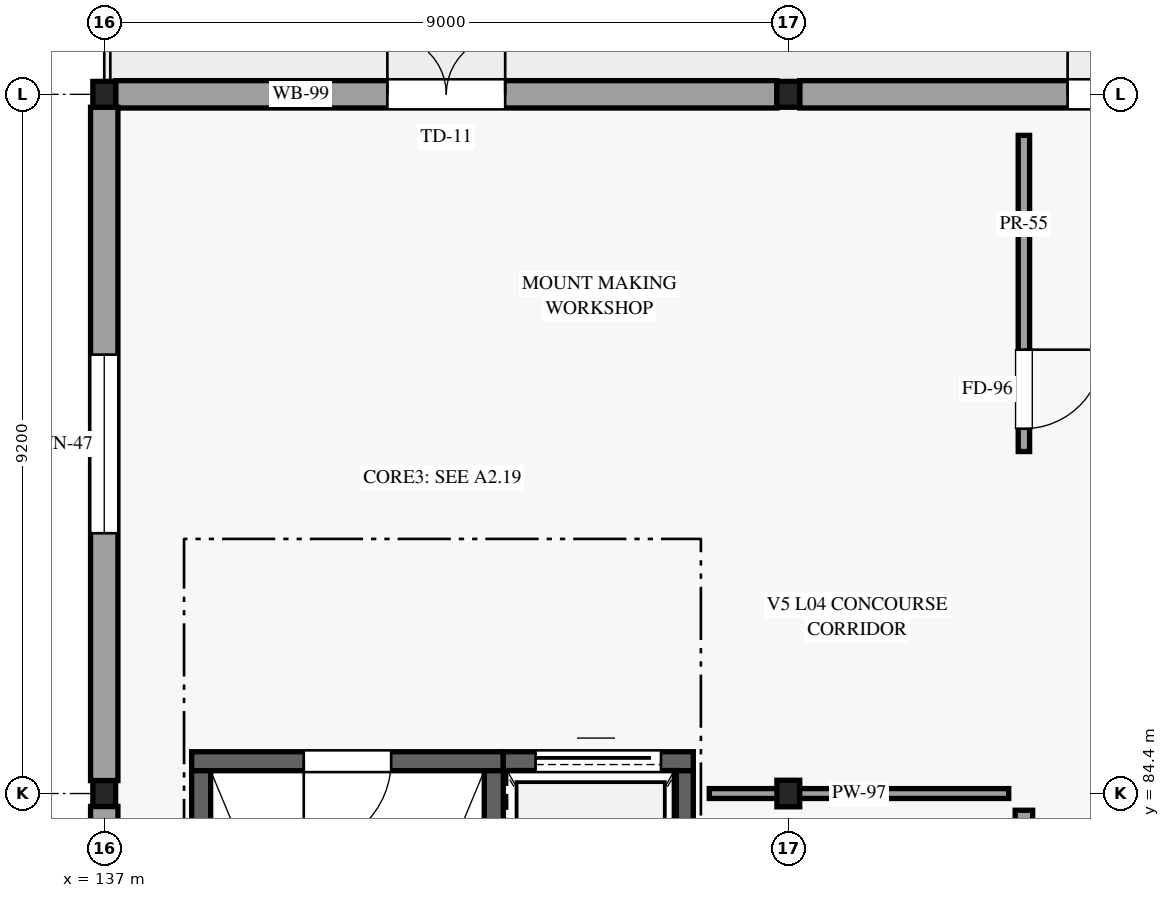
"""IFC4 building model, lengths in metres.
Left out: names, types, materials, properties, quantities, classifications, styles, units other than length and angle.
Written with IfcOpenShell. Run it as: python <this file> out.ifc"""

import sys

from ifc_helpers import new_model, si_unit, direction, frame, frame_2d, origin, origin_2d, place, context, subcontext, project, spatial, rectangle, i_section, extrude, element, fill, save


model = new_model("IFC4")
c1 = context("Model", 3, precision=1e-05, world=origin(), true_north=direction((0.0, 1.0)))
c2 = subcontext(c1, "Body", "Model", "MODEL_VIEW")
j1 = project(units=[si_unit("LENGTHUNIT", "METRE"), si_unit("PLANEANGLEUNIT", "RADIAN")], contexts=[c1])
p1 = place(None, origin())
s1 = spatial("IfcSite", under=j1, at=p1, CompositionType="ELEMENT")
p2 = place(p1, origin())
s2 = spatial("IfcBuilding", under=s1, at=p2, CompositionType="ELEMENT")
p3 = place(p2, frame((0.0, 0.0, 19.5)))
s3 = spatial("IfcBuildingStorey", under=s2, at=p3, CompositionType="ELEMENT", Elevation=19.5)
for number, where, z_axis, x_axis in (
    (1, (137.0, 84.4, 0.0), (0.0, 0.0, 1.0), (1.0, 0.0, 0.0)),
    (2, (137.0, 93.6, 0.0), (0.0, 0.0, 1.0), (1.0, 0.0, 0.0)),
):
    element("IfcColumn", number, at=place(p3, frame(where, z_axis=z_axis, x_axis=x_axis)), inside=s3, PredefinedType="COLUMN", context=c2, shape_type="SweptSolid", body=[
        extrude(i_section(OverallWidth=0.3, OverallDepth=0.34, WebThickness=0.012, FlangeThickness=0.021, FilletRadius=0.027, at=origin_2d()), origin(), (0.0, 0.0, 1.0), 4.5),
    ])
p4 = place(p3, frame((146.0, 84.4, 0.0), z_axis=(0.0, 0.0, 1.0), x_axis=(1.0, 0.0, 0.0)))
e3 = element("IfcColumn", 3, at=p4, inside=s3, PredefinedType="COLUMN", context=c2, shape_type="SweptSolid", body=[
    extrude(i_section(OverallWidth=0.3, OverallDepth=0.35, WebThickness=0.01, FlangeThickness=0.018, FilletRadius=0.027, at=origin_2d()), origin(), (0.0, 0.0, 1.0), 4.5),
])
p5 = place(p3, frame((146.0, 93.6, 0.0), z_axis=(0.0, 0.0, 1.0), x_axis=(1.0, 0.0, 0.0)))
e4 = element("IfcColumn", 4, at=p5, inside=s3, PredefinedType="COLUMN", context=c2, shape_type="SweptSolid", body=[
    extrude(i_section(OverallWidth=0.3, OverallDepth=0.34, WebThickness=0.012, FlangeThickness=0.021, FilletRadius=0.027, at=origin_2d()), origin(), (0.0, 0.0, 1.0), 4.5),
])
p6 = place(p3, frame((137.15, 93.6, 0.0), z_axis=(0.0, 0.0, 1.0), x_axis=(1.0, 0.0, 0.0)))
e5 = element("IfcWall", 5, at=p6, inside=s3, PredefinedType="STANDARD", context=c2, shape_type="SweptSolid", body=[
    extrude(rectangle(XDim=8.7, YDim=0.36, at=frame_2d((4.35, 0.0))), origin(), (0.0, 0.0, 1.0), 3.825),
])
p7 = place(p6, frame((3.575, 0.0, 0.0)))
e6 = element("IfcOpeningElement", 6, at=p7, cuts=e5, PredefinedType="OPENING", context=c2, shape_type="SweptSolid", body=[
    extrude(rectangle(XDim=1.55, YDim=2.3, at=frame_2d((0.775, 1.15))), frame((0.0, 0.19, 0.0), z_axis=(0.0, -1.0, 0.0), x_axis=(1.0, 0.0, 0.0)), (0.0, 0.0, 1.0), 0.38),
])
p8 = place(p3, frame((146.15, 93.6, 0.0), z_axis=(0.0, 0.0, 1.0), x_axis=(1.0, 0.0, 0.0)))
e7 = element("IfcWall", 7, at=p8, inside=s3, PredefinedType="STANDARD", context=c2, shape_type="SweptSolid", body=[
    extrude(rectangle(XDim=8.7, YDim=0.36, at=frame_2d((4.35, 0.0))), origin(), (0.0, 0.0, 1.0), 3.825),
])
p9 = place(p8, frame((3.525, 0.0, 0.0)))
e8 = element("IfcOpeningElement", 8, at=p9, cuts=e7, PredefinedType="OPENING", context=c2, shape_type="SweptSolid", body=[
    extrude(rectangle(XDim=1.65, YDim=2.35, at=frame_2d((0.825, 1.175))), frame((0.0, 0.19, 0.0), z_axis=(0.0, -1.0, 0.0), x_axis=(1.0, 0.0, 0.0)), (0.0, 0.0, 1.0), 0.38),
])
p10 = place(p3, frame((137.0, 75.37, 0.0), z_axis=(0.0, 0.0, 1.0), x_axis=(0.0, 1.0, 0.0)))
e9 = element("IfcWall", 9, at=p10, inside=s3, PredefinedType="STANDARD", context=c2, shape_type="SweptSolid", body=[
    extrude(rectangle(XDim=8.86, YDim=0.36, at=frame_2d((4.43, 0.0))), origin(), (0.0, 0.0, 1.0), 3.825),
])
p11 = place(p10, frame((3.355, 0.0, 0.85)))
e10 = element("IfcOpeningElement", 10, at=p11, cuts=e9, PredefinedType="OPENING", context=c2, shape_type="SweptSolid", body=[
    extrude(rectangle(XDim=2.15, YDim=2.25, at=frame_2d((1.075, 1.125))), frame((0.0, 0.19, 0.0), z_axis=(0.0, -1.0, 0.0), x_axis=(1.0, 0.0, 0.0)), (0.0, 0.0, 1.0), 0.38),
])
p12 = place(p3, frame((137.0, 84.57, 0.0), z_axis=(0.0, 0.0, 1.0), x_axis=(0.0, 1.0, 0.0)))
e11 = element("IfcWall", 11, at=p12, inside=s3, PredefinedType="STANDARD", context=c2, shape_type="SweptSolid", body=[
    extrude(rectangle(XDim=8.86, YDim=0.36, at=frame_2d((4.43, 0.0))), origin(), (0.0, 0.0, 1.0), 3.825),
])
p13 = place(p12, frame((3.255, 0.0, 0.85)))
e12 = element("IfcOpeningElement", 12, at=p13, cuts=e11, PredefinedType="OPENING", context=c2, shape_type="SweptSolid", body=[
    extrude(rectangle(XDim=2.35, YDim=2.35, at=frame_2d((1.175, 1.175))), frame((0.0, 0.19, 0.0), z_axis=(0.0, -1.0, 0.0), x_axis=(1.0, 0.0, 0.0)), (0.0, 0.0, 1.0), 0.38),
])
p14 = place(p3, frame((138.15, 84.825, 0.0), z_axis=(0.0, 0.0, 1.0), x_axis=(1.0, 0.0, 0.0)))
e13 = element("IfcWall", 13, at=p14, inside=s3, PredefinedType="SHEAR", context=c2, shape_type="SweptSolid", body=[
    extrude(rectangle(XDim=4.1, YDim=0.25, at=frame_2d((2.05, 0.0))), origin(), (0.0, 0.0, 1.0), 4.22),
])
p15 = place(p14, frame((2.625, 0.0, 0.0), z_axis=(0.0, 0.0, 1.0), x_axis=(-1.0, 0.0, 0.0)))
e14 = element("IfcOpeningElement", 14, at=p15, cuts=e13, PredefinedType="OPENING", context=c2, shape_type="SweptSolid", body=[
    extrude(rectangle(XDim=1.15, YDim=2.2, at=frame_2d((0.575, 1.1))), frame((0.0, 0.135, 0.0), z_axis=(0.0, -1.0, 0.0), x_axis=(1.0, 0.0, 0.0)), (0.0, 0.0, 1.0), 0.27),
])
for number, where, z_axis, x_axis in (
    (15, (138.275, 76.05, 0.0), (0.0, 0.0, 1.0), (0.0, 1.0, 0.0)),
    (16, (142.125, 76.05, 0.0), (0.0, 0.0, 1.0), (0.0, 1.0, 0.0)),
):
    element("IfcWall", number, at=place(p3, frame(where, z_axis=z_axis, x_axis=x_axis)), inside=s3, PredefinedType="SHEAR", context=c2, shape_type="SweptSolid", body=[
        extrude(rectangle(XDim=8.65, YDim=0.25, at=frame_2d((4.325, 0.0))), origin(), (0.0, 0.0, 1.0), 4.22),
    ])
p16 = place(p3, frame((142.25, 84.825, 0.0), z_axis=(0.0, 0.0, 1.0), x_axis=(1.0, 0.0, 0.0)))
e17 = element("IfcWall", 17, at=p16, inside=s3, PredefinedType="SHEAR", context=c2, shape_type="SweptSolid", body=[
    extrude(rectangle(XDim=2.5, YDim=0.25, at=frame_2d((1.25, 0.0))), origin(), (0.0, 0.0, 1.0), 4.22),
])
p17 = place(p16, frame((0.425, 0.0, 0.0)))
e18 = element("IfcOpeningElement", 18, at=p17, cuts=e17, PredefinedType="OPENING", context=c2, shape_type="SweptSolid", body=[
    extrude(rectangle(XDim=1.65, YDim=2.45, at=frame_2d((0.825, 1.225))), frame((0.0, 0.135, 0.0), z_axis=(0.0, -1.0, 0.0), x_axis=(1.0, 0.0, 0.0)), (0.0, 0.0, 1.0), 0.27),
])
p18 = place(p3, frame((144.625, 80.9, 0.0), z_axis=(0.0, 0.0, 1.0), x_axis=(0.0, 1.0, 0.0)))
e19 = element("IfcWall", 19, at=p18, inside=s3, PredefinedType="SHEAR", context=c2, shape_type="SweptSolid", body=[
    extrude(rectangle(XDim=3.8, YDim=0.25, at=frame_2d((1.9, 0.0))), origin(), (0.0, 0.0, 1.0), 4.22),
])
p19 = place(p3, frame((149.1, 75.42, 0.0), z_axis=(0.0, 0.0, 1.0), x_axis=(0.0, 1.0, 0.0)))
e20 = element("IfcWall", 20, at=p19, inside=s3, PredefinedType="PARTITIONING", context=c2, shape_type="SweptSolid", body=[
    extrude(rectangle(XDim=8.76, YDim=0.23, at=frame_2d((4.38, 0.0))), origin(), (0.0, 0.0, 1.0), 3.825),
])
p20 = place(p19, frame((4.86, 0.0, 0.0), z_axis=(0.0, 0.0, 1.0), x_axis=(-1.0, 0.0, 0.0)))
e21 = element("IfcOpeningElement", 21, at=p20, cuts=e20, PredefinedType="OPENING", context=c2, shape_type="SweptSolid", body=[
    extrude(rectangle(XDim=0.98, YDim=2.18, at=frame_2d((0.49, 1.09))), frame((0.0, 0.125, 0.0), z_axis=(0.0, -1.0, 0.0), x_axis=(1.0, 0.0, 0.0)), (0.0, 0.0, 1.0), 0.25),
])
p21 = place(p3, frame((144.96, 84.4, 0.0), z_axis=(0.0, 0.0, 1.0), x_axis=(1.0, 0.0, 0.0)))
e22 = element("IfcWall", 22, at=p21, inside=s3, PredefinedType="PARTITIONING", context=c2, shape_type="SweptSolid", body=[
    extrude(rectangle(XDim=3.94, YDim=0.13, at=frame_2d((1.97, 0.0))), origin(), (0.0, 0.0, 1.0), 3.825),
])
p22 = place(p3, frame((149.1, 88.9, 0.0), z_axis=(0.0, 0.0, 1.0), x_axis=(0.0, 1.0, 0.0)))
e23 = element("IfcWall", 23, at=p22, inside=s3, PredefinedType="PARTITIONING", context=c2, shape_type="SweptSolid", body=[
    extrude(rectangle(XDim=4.16, YDim=0.15, at=frame_2d((2.08, 0.0))), origin(), (0.0, 0.0, 1.0), 4.18),
])
p23 = place(p22, frame((1.34, 0.0, 0.0), z_axis=(0.0, 0.0, 1.0), x_axis=(-1.0, 0.0, 0.0)))
e24 = element("IfcOpeningElement", 24, at=p23, cuts=e23, PredefinedType="OPENING", context=c2, shape_type="SweptSolid", body=[
    extrude(rectangle(XDim=1.04, YDim=2.22, at=frame_2d((0.52, 1.11))), frame((0.0, 0.085, 0.0), z_axis=(0.0, -1.0, 0.0), x_axis=(1.0, 0.0, 0.0)), (0.0, 0.0, 1.0), 0.17),
])
p24 = place(p7, origin())
e25 = element("IfcDoor", 25, at=p24, inside=s3, OperationType="DOUBLE_DOOR_SINGLE_SWING", PredefinedType="DOOR", context=c2, shape_type="SweptSolid", body=[
    extrude(rectangle(XDim=1.55, YDim=2.3, at=frame_2d((0.775, 1.15))), frame((0.0, 0.025, 0.0), z_axis=(0.0, -1.0, 0.0), x_axis=(1.0, 0.0, 0.0)), (0.0, 0.0, 1.0), 0.05),
])
fill(e6, e25)
p25 = place(p9, origin())
e26 = element("IfcDoor", 26, at=p25, inside=s3, OperationType="DOUBLE_DOOR_SINGLE_SWING", PredefinedType="DOOR", context=c2, shape_type="SweptSolid", body=[
    extrude(rectangle(XDim=1.65, YDim=2.35, at=frame_2d((0.825, 1.175))), frame((0.0, 0.025, 0.0), z_axis=(0.0, -1.0, 0.0), x_axis=(1.0, 0.0, 0.0)), (0.0, 0.0, 1.0), 0.05),
])
fill(e8, e26)
p26 = place(p13, origin())
e27 = element("IfcWindow", 27, at=p26, inside=s3, PartitioningType="SINGLE_PANEL", PredefinedType="WINDOW", context=c2, shape_type="SweptSolid", body=[
    extrude(rectangle(XDim=2.35, YDim=2.35, at=frame_2d((1.175, 1.175))), frame((0.0, 0.03, 0.0), z_axis=(0.0, -1.0, 0.0), x_axis=(1.0, 0.0, 0.0)), (0.0, 0.0, 1.0), 0.06),
])
fill(e12, e27)
p27 = place(p15, origin())
e28 = element("IfcDoor", 28, at=p27, inside=s3, OperationType="SINGLE_SWING_RIGHT", PredefinedType="DOOR", context=c2, shape_type="SweptSolid", body=[
    extrude(rectangle(XDim=1.15, YDim=2.2, at=frame_2d((0.575, 1.1))), frame((0.0, 0.025, 0.0), z_axis=(0.0, -1.0, 0.0), x_axis=(1.0, 0.0, 0.0)), (0.0, 0.0, 1.0), 0.05),
])
fill(e14, e28)
p28 = place(p17, origin())
e29 = element("IfcDoor", 29, at=p28, inside=s3, OperationType="SLIDING_TO_LEFT", PredefinedType="DOOR", context=c2, shape_type="SweptSolid", body=[
    extrude(rectangle(XDim=1.65, YDim=2.45, at=frame_2d((0.825, 1.225))), frame((0.0, 0.025, 0.0), z_axis=(0.0, -1.0, 0.0), x_axis=(1.0, 0.0, 0.0)), (0.0, 0.0, 1.0), 0.05),
])
fill(e18, e29)
p29 = place(p23, origin())
e30 = element("IfcDoor", 30, at=p29, inside=s3, OperationType="SINGLE_SWING_LEFT", PredefinedType="DOOR", context=c2, shape_type="SweptSolid", body=[
    extrude(rectangle(XDim=1.04, YDim=2.22, at=frame_2d((0.52, 1.11))), frame((0.0, 0.025, 0.0), z_axis=(0.0, -1.0, 0.0), x_axis=(1.0, 0.0, 0.0)), (0.0, 0.0, 1.0), 0.05),
])
fill(e24, e30)
save(model, sys.argv[1])
